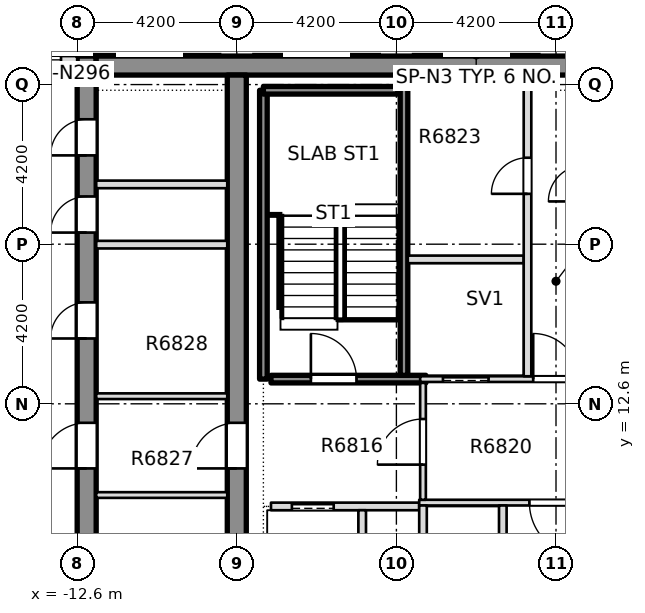
"""IFC4 building model, lengths in metres.
Left out: names, types, materials, properties, quantities, classifications, styles, units other than length and angle.
Written with IfcOpenShell. Run it as: python <this file> out.ifc"""

import sys

from ifc_helpers import new_model, si_unit, direction, frame, frame_2d, origin, place, context, subcontext, project, spatial, rectangle, extrude, element, fill, save


model = new_model("IFC4")
c1 = context("Model", 3, precision=1e-05, world=origin(), true_north=direction((0.0, 1.0)))
c2 = subcontext(c1, "Body", "Model", "MODEL_VIEW")
j1 = project(units=[si_unit("LENGTHUNIT", "METRE"), si_unit("PLANEANGLEUNIT", "RADIAN")], contexts=[c1])
p1 = place(None, origin())
s1 = spatial("IfcSite", under=j1, at=p1, CompositionType="ELEMENT")
p2 = place(p1, origin())
s2 = spatial("IfcBuilding", under=s1, at=p2, CompositionType="ELEMENT")
p3 = place(p2, frame((0.0, 0.0, 257.95)))
s3 = spatial("IfcBuildingStorey", under=s2, at=p3, CompositionType="ELEMENT", Elevation=257.95)
p4 = place(p3, frame((-12.35, -8.4, -0.4), z_axis=(0.0, 0.0, 1.0), x_axis=(0.0, 1.0, 0.0)))
e1 = element("IfcWall", 1, at=p4, inside=s3, PredefinedType="SHEAR", context=c2, shape_type="SweptSolid", body=[
    extrude(rectangle(XDim=30.15, YDim=0.5, at=frame_2d((15.075, 0.0))), origin(), (0.0, 0.0, 1.0), 3.45),
])
p5 = place(p4, frame((5.083, 0.0, 0.4)))
e2 = element("IfcOpeningElement", 2, at=p5, cuts=e1, PredefinedType="OPENING", context=c2, shape_type="SweptSolid", body=[
    extrude(rectangle(XDim=0.95, YDim=2.1, at=frame_2d((0.475, 1.05))), frame((0.0, 0.26, 0.0), z_axis=(0.0, -1.0, 0.0), x_axis=(1.0, 0.0, 0.0)), (0.0, 0.0, 1.0), 0.52),
])
p6 = place(p4, frame((13.933, 0.0, 0.4)))
e3 = element("IfcOpeningElement", 3, at=p6, cuts=e1, PredefinedType="OPENING", context=c2, shape_type="SweptSolid", body=[
    extrude(rectangle(XDim=0.95, YDim=2.1, at=frame_2d((0.475, 1.05))), frame((0.0, 0.26, 0.0), z_axis=(0.0, -1.0, 0.0), x_axis=(1.0, 0.0, 0.0)), (0.0, 0.0, 1.0), 0.52),
])
p7 = place(p4, frame((22.719, 0.0, 0.4)))
e4 = element("IfcOpeningElement", 4, at=p7, cuts=e1, PredefinedType="OPENING", context=c2, shape_type="SweptSolid", body=[
    extrude(rectangle(XDim=0.95, YDim=2.1, at=frame_2d((0.475, 1.05))), frame((0.0, 0.26, 0.0), z_axis=(0.0, -1.0, 0.0), x_axis=(1.0, 0.0, 0.0)), (0.0, 0.0, 1.0), 0.52),
])
p8 = place(p4, frame((25.506, 0.0, 0.4)))
e5 = element("IfcOpeningElement", 5, at=p8, cuts=e1, PredefinedType="OPENING", context=c2, shape_type="SweptSolid", body=[
    extrude(rectangle(XDim=0.95, YDim=2.1, at=frame_2d((0.475, 1.05))), frame((0.0, 0.26, 0.0), z_axis=(0.0, -1.0, 0.0), x_axis=(1.0, 0.0, 0.0)), (0.0, 0.0, 1.0), 0.52),
])
p9 = place(p4, frame((27.537, 0.0, 0.4)))
e6 = element("IfcOpeningElement", 6, at=p9, cuts=e1, PredefinedType="OPENING", context=c2, shape_type="SweptSolid", body=[
    extrude(rectangle(XDim=0.95, YDim=2.1, at=frame_2d((0.475, 1.05))), frame((0.0, 0.26, 0.0), z_axis=(0.0, -1.0, 0.0), x_axis=(1.0, 0.0, 0.0)), (0.0, 0.0, 1.0), 0.52),
])
p10 = place(p4, frame((19.3, 0.0, 0.4)))
e7 = element("IfcOpeningElement", 7, at=p10, cuts=e1, PredefinedType="OPENING", context=c2, shape_type="SweptSolid", body=[
    extrude(rectangle(XDim=1.2, YDim=2.1, at=frame_2d((0.6, 1.05))), frame((0.0, 0.26, 0.0), z_axis=(0.0, -1.0, 0.0), x_axis=(1.0, 0.0, 0.0)), (0.0, 0.0, 1.0), 0.52),
])
p11 = place(p3, frame((-12.1, 21.5, -0.4), z_axis=(0.0, 0.0, 1.0), x_axis=(1.0, 0.0, 0.0)))
e8 = element("IfcWall", 8, at=p11, inside=s3, PredefinedType="SHEAR", context=c2, shape_type="SweptSolid", body=[
    extrude(rectangle(XDim=24.2, YDim=0.5, at=frame_2d((12.1, 0.0))), origin(), (0.0, 0.0, 1.0), 3.45),
])
p12 = place(p3, frame((-8.4, -7.9, -0.4), z_axis=(0.0, 0.0, 1.0), x_axis=(0.0, 1.0, 0.0)))
e9 = element("IfcWall", 9, at=p12, inside=s3, PredefinedType="SHEAR", context=c2, shape_type="SweptSolid", body=[
    extrude(rectangle(XDim=29.15, YDim=0.5, at=frame_2d((14.575, 0.0))), origin(), (0.0, 0.0, 1.0), 3.45),
])
p13 = place(p12, frame((18.8, 0.0, 0.4)))
e10 = element("IfcOpeningElement", 10, at=p13, cuts=e9, PredefinedType="OPENING", context=c2, shape_type="SweptSolid", body=[
    extrude(rectangle(XDim=1.2, YDim=2.1, at=frame_2d((0.6, 1.05))), frame((0.0, 0.26, 0.0), z_axis=(0.0, -1.0, 0.0), x_axis=(1.0, 0.0, 0.0)), (0.0, 0.0, 1.0), 0.52),
])
p14 = place(p3, frame((-12.6, 21.65, 0.0), z_axis=(0.0, 0.0, 1.0), x_axis=(-1.0, 0.0, 0.0)))
e11 = element("IfcWall", 11, at=p14, inside=s3, PredefinedType="STANDARD", context=c2, shape_type="SweptSolid", body=[
    extrude(rectangle(XDim=3.75, YDim=0.2, at=frame_2d((1.875, 0.0))), origin(), (0.0, 0.0, 1.0), 3.05),
])
p15 = place(p14, frame((0.425, 0.0, 0.2)))
e12 = element("IfcOpeningElement", 12, at=p15, cuts=e11, PredefinedType="OPENING", context=c2, shape_type="SweptSolid", body=[
    extrude(rectangle(XDim=1.8, YDim=2.65, at=frame_2d((0.9, 1.325))), frame((0.0, 0.11, 0.0), z_axis=(0.0, -1.0, 0.0), x_axis=(1.0, 0.0, 0.0)), (0.0, 0.0, 1.0), 0.22),
])
p16 = place(p14, frame((2.325, 0.0, 0.0)))
e13 = element("IfcOpeningElement", 13, at=p16, cuts=e11, PredefinedType="OPENING", context=c2, shape_type="SweptSolid", body=[
    extrude(rectangle(XDim=1.0, YDim=2.4, at=frame_2d((0.5, 1.2))), frame((0.0, 0.11, 0.0), z_axis=(0.0, -1.0, 0.0), x_axis=(1.0, 0.0, 0.0)), (0.0, 0.0, 1.0), 0.22),
])
p17 = place(p3, frame((-7.5, 9.9, 0.0), z_axis=(0.0, 0.0, 1.0), x_axis=(1.0, 0.0, 0.0)))
e14 = element("IfcWall", 14, at=p17, inside=s3, PredefinedType="PARTITIONING", context=c2, shape_type="SweptSolid", body=[
    extrude(rectangle(XDim=3.9, YDim=0.2, at=frame_2d((1.95, 0.0))), origin(), (0.0, 0.0, 1.0), 3.05),
])
p18 = place(p17, frame((0.55, 0.0, 0.0)))
e15 = element("IfcOpeningElement", 15, at=p18, cuts=e14, PredefinedType="OPENING", context=c2, shape_type="SweptSolid", body=[
    extrude(rectangle(XDim=1.1, YDim=2.1, at=frame_2d((0.55, 1.05))), frame((0.0, 0.11, 0.0), z_axis=(0.0, -1.0, 0.0), x_axis=(1.0, 0.0, 0.0)), (0.0, 0.0, 1.0), 0.22),
])
p19 = place(p3, frame((-3.6, 10.0, 0.0), z_axis=(0.0, 0.0, 1.0), x_axis=(1.0, 0.0, 0.0)))
e16 = element("IfcWall", 16, at=p19, inside=s3, PredefinedType="PARTITIONING", context=c2, shape_type="SweptSolid", body=[
    extrude(rectangle(XDim=7.2, YDim=0.15, at=frame_2d((3.6, 0.0))), origin(), (0.0, 0.0, 1.0), 3.05),
])
p20 = place(p19, frame((2.9, 0.0, 0.0)))
e17 = element("IfcOpeningElement", 17, at=p20, cuts=e16, PredefinedType="OPENING", context=c2, shape_type="SweptSolid", body=[
    extrude(rectangle(XDim=1.4, YDim=2.1, at=frame_2d((0.7, 1.05))), frame((0.0, 0.085, 0.0), z_axis=(0.0, -1.0, 0.0), x_axis=(1.0, 0.0, 0.0)), (0.0, 0.0, 1.0), 0.17),
])
p21 = place(p3, frame((-7.5, 13.25, 0.0), z_axis=(0.0, 0.0, 1.0), x_axis=(1.0, 0.0, 0.0)))
e18 = element("IfcWall", 18, at=p21, inside=s3, PredefinedType="SOLIDWALL", context=c2, shape_type="SweptSolid", body=[
    extrude(rectangle(XDim=4.075, YDim=0.2, at=frame_2d((2.038, 0.0))), origin(), (0.0, 0.0, 1.0), 3.05),
])
p22 = place(p21, frame((1.05, 0.0, 0.0)))
e19 = element("IfcOpeningElement", 19, at=p22, cuts=e18, PredefinedType="OPENING", context=c2, shape_type="SweptSolid", body=[
    extrude(rectangle(XDim=1.2, YDim=2.1, at=frame_2d((0.6, 1.05))), frame((0.0, 0.11, 0.0), z_axis=(0.0, -1.0, 0.0), x_axis=(1.0, 0.0, 0.0)), (0.0, 0.0, 1.0), 0.22),
])
p23 = place(p3, frame((-3.575, 13.25, 0.0), z_axis=(0.0, 0.0, 1.0), x_axis=(1.0, 0.0, 0.0)))
e20 = element("IfcWall", 20, at=p23, inside=s3, PredefinedType="PARTITIONING", context=c2, shape_type="SweptSolid", body=[
    extrude(rectangle(XDim=7.15, YDim=0.15, at=frame_2d((3.575, 0.0))), origin(), (0.0, 0.0, 1.0), 3.05),
])
p24 = place(p23, frame((0.6, 0.0, 0.0)))
e21 = element("IfcOpeningElement", 21, at=p24, cuts=e20, PredefinedType="OPENING", context=c2, shape_type="SweptSolid", body=[
    extrude(rectangle(XDim=1.2, YDim=2.1, at=frame_2d((0.6, 1.05))), frame((0.0, 0.085, 0.0), z_axis=(0.0, -1.0, 0.0), x_axis=(1.0, 0.0, 0.0)), (0.0, 0.0, 1.0), 0.17),
])
p25 = place(p23, frame((5.4, 0.0, 0.0)))
e22 = element("IfcOpeningElement", 22, at=p25, cuts=e20, PredefinedType="OPENING", context=c2, shape_type="SweptSolid", body=[
    extrude(rectangle(XDim=1.1, YDim=2.1, at=frame_2d((0.55, 1.05))), frame((0.0, 0.085, 0.0), z_axis=(0.0, -1.0, 0.0), x_axis=(1.0, 0.0, 0.0)), (0.0, 0.0, 1.0), 0.17),
])
p26 = place(p23, frame((2.975, 0.0, 0.0)))
e23 = element("IfcOpeningElement", 23, at=p26, cuts=e20, PredefinedType="OPENING", context=c2, shape_type="SweptSolid", body=[
    extrude(rectangle(XDim=1.2, YDim=2.1, at=frame_2d((0.6, 1.05))), frame((0.0, 0.085, 0.0), z_axis=(0.0, -1.0, 0.0), x_axis=(1.0, 0.0, 0.0)), (0.0, 0.0, 1.0), 0.17),
])
p27 = place(p3, frame((-3.9, 16.4, 0.0), z_axis=(0.0, 0.0, 1.0), x_axis=(1.0, 0.0, 0.0)))
e24 = element("IfcWall", 24, at=p27, inside=s3, PredefinedType="PARTITIONING", context=c2, shape_type="SweptSolid", body=[
    extrude(rectangle(XDim=3.05, YDim=0.2, at=frame_2d((1.525, 0.0))), origin(), (0.0, 0.0, 1.0), 3.05),
])
p28 = place(p3, frame((-5.1, 7.075, 0.0), z_axis=(0.0, 0.0, 1.0), x_axis=(0.0, 1.0, 0.0)))
e25 = element("IfcWall", 25, at=p28, inside=s3, PredefinedType="PARTITIONING", context=c2, shape_type="SweptSolid", body=[
    extrude(rectangle(XDim=2.725, YDim=0.2, at=frame_2d((1.363, 0.0))), origin(), (0.0, 0.0, 1.0), 3.05),
])
p29 = place(p3, frame((-4.0, 13.35, 0.0), z_axis=(0.0, 0.0, 1.0), x_axis=(0.0, 1.0, 0.0)))
e26 = element("IfcWall", 26, at=p29, inside=s3, PredefinedType="SOLIDWALL", context=c2, shape_type="SweptSolid", body=[
    extrude(rectangle(XDim=7.899, YDim=0.2, at=frame_2d((3.949, 0.0))), origin(), (0.0, 0.0, 1.0), 3.05),
])
p30 = place(p3, frame((-3.5, 7.075, 0.0), z_axis=(0.0, 0.0, 1.0), x_axis=(0.0, 1.0, 0.0)))
e27 = element("IfcWall", 27, at=p30, inside=s3, PredefinedType="PARTITIONING", context=c2, shape_type="SweptSolid", body=[
    extrude(rectangle(XDim=2.85, YDim=0.2, at=frame_2d((1.425, 0.0))), origin(), (0.0, 0.0, 1.0), 3.05),
])
p31 = place(p3, frame((-3.5, 10.075, 0.0), z_axis=(0.0, 0.0, 1.0), x_axis=(0.0, 1.0, 0.0)))
e28 = element("IfcWall", 28, at=p31, inside=s3, PredefinedType="PARTITIONING", context=c2, shape_type="SweptSolid", body=[
    extrude(rectangle(XDim=3.075, YDim=0.15, at=frame_2d((1.538, 0.0))), origin(), (0.0, 0.0, 1.0), 3.05),
])
p32 = place(p31, frame((0.925, 0.0, 0.0)))
e29 = element("IfcOpeningElement", 29, at=p32, cuts=e28, PredefinedType="OPENING", context=c2, shape_type="SweptSolid", body=[
    extrude(rectangle(XDim=1.2, YDim=2.1, at=frame_2d((0.6, 1.05))), frame((0.0, 0.085, 0.0), z_axis=(0.0, -1.0, 0.0), x_axis=(1.0, 0.0, 0.0)), (0.0, 0.0, 1.0), 0.17),
])
p33 = place(p3, frame((-1.4, 7.075, 0.0), z_axis=(0.0, 0.0, 1.0), x_axis=(0.0, 1.0, 0.0)))
e30 = element("IfcWall", 30, at=p33, inside=s3, PredefinedType="PARTITIONING", context=c2, shape_type="SweptSolid", body=[
    extrude(rectangle(XDim=2.85, YDim=0.2, at=frame_2d((1.425, 0.0))), origin(), (0.0, 0.0, 1.0), 3.05),
])
p34 = place(p3, frame((-0.75, 13.325, 0.0), z_axis=(0.0, 0.0, 1.0), x_axis=(0.0, 1.0, 0.0)))
e31 = element("IfcWall", 31, at=p34, inside=s3, PredefinedType="PARTITIONING", context=c2, shape_type="SweptSolid", body=[
    extrude(rectangle(XDim=7.924, YDim=0.2, at=frame_2d((3.962, 0.0))), origin(), (0.0, 0.0, 1.0), 3.05),
])
p35 = place(p34, frame((4.8, 0.0, 0.0)))
e32 = element("IfcOpeningElement", 32, at=p35, cuts=e31, PredefinedType="OPENING", context=c2, shape_type="SweptSolid", body=[
    extrude(rectangle(XDim=0.95, YDim=2.1, at=frame_2d((0.475, 1.05))), frame((0.0, 0.11, 0.0), z_axis=(0.0, -1.0, 0.0), x_axis=(1.0, 0.0, 0.0)), (0.0, 0.0, 1.0), 0.22),
])
for number, where, z_axis, x_axis in (
    (33, (-12.099, 10.2, 0.0), (0.0, 0.0, 1.0), (1.0, 0.0, 0.0)),
    (34, (-12.099, 12.8, 0.0), (0.0, 0.0, 1.0), (1.0, 0.0, 0.0)),
):
    element("IfcWall", number, at=place(p3, frame(where, z_axis=z_axis, x_axis=x_axis)), inside=s3, PredefinedType="PARTITIONING", context=c2, shape_type="SweptSolid", body=[
        extrude(rectangle(XDim=3.448, YDim=0.15, at=frame_2d((1.724, 0.0))), origin(), (0.0, 0.0, 1.0), 3.05),
    ])
for number, where, z_axis, x_axis in (
    (35, (-12.099, 16.788, 0.0), (0.0, 0.0, 1.0), (1.0, 0.0, 0.0)),
    (36, (-12.099, 18.373, 0.0), (0.0, 0.0, 1.0), (1.0, 0.0, 0.0)),
):
    element("IfcWall", number, at=place(p3, frame(where, z_axis=z_axis, x_axis=x_axis)), inside=s3, PredefinedType="PARTITIONING", context=c2, shape_type="SweptSolid", body=[
        extrude(rectangle(XDim=3.448, YDim=0.2, at=frame_2d((1.724, 0.0))), origin(), (0.0, 0.0, 1.0), 3.05),
    ])
p36 = place(p3, frame((-7.7, 13.25, 0.0), z_axis=(0.0, 0.0, 1.0), x_axis=(0.0, 1.0, 0.0)))
e37 = element("IfcWall", 37, at=p36, inside=s3, PredefinedType="SOLIDWALL", context=c2, shape_type="SweptSolid", body=[
    extrude(rectangle(XDim=7.6, YDim=0.2, at=frame_2d((3.8, 0.0))), origin(), (0.0, 0.0, 1.0), 3.05),
])
p37 = place(p3, frame((-7.7, 20.85, 0.0), z_axis=(0.0, 0.0, 1.0), x_axis=(1.0, 0.0, 0.0)))
e38 = element("IfcWall", 38, at=p37, inside=s3, PredefinedType="SOLIDWALL", context=c2, shape_type="SweptSolid", body=[
    extrude(rectangle(XDim=3.55, YDim=0.2, at=frame_2d((1.775, 0.0))), origin(), (0.0, 0.0, 1.0), 3.05),
])
p38 = place(p15, origin())
e39 = element("IfcWindow", 39, at=p38, inside=s3, PartitioningType="SINGLE_PANEL", PredefinedType="WINDOW", context=c2, shape_type="SweptSolid", body=[
    extrude(rectangle(XDim=1.8, YDim=2.65, at=frame_2d((0.9, 1.325))), frame((0.0, 0.03, 0.0), z_axis=(0.0, -1.0, 0.0), x_axis=(1.0, 0.0, 0.0)), (0.0, 0.0, 1.0), 0.06),
])
fill(e12, e39)
p39 = place(p22, origin())
e40 = element("IfcDoor", 40, at=p39, inside=s3, OperationType="SINGLE_SWING_LEFT", PredefinedType="DOOR", context=c2, shape_type="SweptSolid", body=[
    extrude(rectangle(XDim=1.2, YDim=2.1, at=frame_2d((0.6, 1.05))), frame((0.0, 0.025, 0.0), z_axis=(0.0, -1.0, 0.0), x_axis=(1.0, 0.0, 0.0)), (0.0, 0.0, 1.0), 0.05),
])
fill(e19, e40)
p40 = place(p18, origin())
e41 = element("IfcDoor", 41, at=p40, inside=s3, OperationType="SLIDING_TO_RIGHT", PredefinedType="DOOR", context=c2, shape_type="SweptSolid", body=[
    extrude(rectangle(XDim=1.1, YDim=2.1, at=frame_2d((0.55, 1.05))), frame((0.0, 0.025, 0.0), z_axis=(0.0, -1.0, 0.0), x_axis=(1.0, 0.0, 0.0)), (0.0, 0.0, 1.0), 0.05),
])
fill(e15, e41)
p41 = place(p20, origin())
e42 = element("IfcDoor", 42, at=p41, inside=s3, OperationType="SINGLE_SWING_RIGHT", PredefinedType="DOOR", context=c2, shape_type="SweptSolid", body=[
    extrude(rectangle(XDim=1.4, YDim=2.1, at=frame_2d((0.7, 1.05))), frame((0.0, 0.025, 0.0), z_axis=(0.0, -1.0, 0.0), x_axis=(1.0, 0.0, 0.0)), (0.0, 0.0, 1.0), 0.05),
])
fill(e17, e42)
p42 = place(p24, origin())
e43 = element("IfcDoor", 43, at=p42, inside=s3, OperationType="SLIDING_TO_RIGHT", PredefinedType="DOOR", context=c2, shape_type="SweptSolid", body=[
    extrude(rectangle(XDim=1.2, YDim=2.1, at=frame_2d((0.6, 1.05))), frame((0.0, 0.025, 0.0), z_axis=(0.0, -1.0, 0.0), x_axis=(1.0, 0.0, 0.0)), (0.0, 0.0, 1.0), 0.05),
])
fill(e21, e43)
p43 = place(p26, origin())
e44 = element("IfcDoor", 44, at=p43, inside=s3, OperationType="SINGLE_SWING_RIGHT", PredefinedType="DOOR", context=c2, shape_type="SweptSolid", body=[
    extrude(rectangle(XDim=1.2, YDim=2.1, at=frame_2d((0.6, 1.05))), frame((0.0, 0.025, 0.0), z_axis=(0.0, -1.0, 0.0), x_axis=(1.0, 0.0, 0.0)), (0.0, 0.0, 1.0), 0.05),
])
fill(e23, e44)
p44 = place(p35, origin())
e45 = element("IfcDoor", 45, at=p44, inside=s3, OperationType="SINGLE_SWING_RIGHT", PredefinedType="DOOR", context=c2, shape_type="SweptSolid", body=[
    extrude(rectangle(XDim=0.95, YDim=2.1, at=frame_2d((0.475, 1.05))), frame((0.0, 0.025, 0.0), z_axis=(0.0, -1.0, 0.0), x_axis=(1.0, 0.0, 0.0)), (0.0, 0.0, 1.0), 0.05),
])
fill(e32, e45)
p45 = place(p32, origin())
e46 = element("IfcDoor", 46, at=p45, inside=s3, OperationType="SINGLE_SWING_RIGHT", PredefinedType="DOOR", context=c2, shape_type="SweptSolid", body=[
    extrude(rectangle(XDim=1.2, YDim=2.1, at=frame_2d((0.6, 1.05))), frame((0.0, 0.025, 0.0), z_axis=(0.0, -1.0, 0.0), x_axis=(1.0, 0.0, 0.0)), (0.0, 0.0, 1.0), 0.05),
])
fill(e29, e46)
p46 = place(p7, origin())
e47 = element("IfcDoor", 47, at=p46, inside=s3, OperationType="SINGLE_SWING_LEFT", PredefinedType="DOOR", context=c2, shape_type="SweptSolid", body=[
    extrude(rectangle(XDim=0.95, YDim=2.1, at=frame_2d((0.475, 1.05))), frame((0.0, 0.025, 0.0), z_axis=(0.0, -1.0, 0.0), x_axis=(1.0, 0.0, 0.0)), (0.0, 0.0, 1.0), 0.05),
])
fill(e4, e47)
p47 = place(p8, origin())
e48 = element("IfcDoor", 48, at=p47, inside=s3, OperationType="SINGLE_SWING_LEFT", PredefinedType="DOOR", context=c2, shape_type="SweptSolid", body=[
    extrude(rectangle(XDim=0.95, YDim=2.1, at=frame_2d((0.475, 1.05))), frame((0.0, 0.025, 0.0), z_axis=(0.0, -1.0, 0.0), x_axis=(1.0, 0.0, 0.0)), (0.0, 0.0, 1.0), 0.05),
])
fill(e5, e48)
p48 = place(p9, origin())
e49 = element("IfcDoor", 49, at=p48, inside=s3, OperationType="SINGLE_SWING_LEFT", PredefinedType="DOOR", context=c2, shape_type="SweptSolid", body=[
    extrude(rectangle(XDim=0.95, YDim=2.1, at=frame_2d((0.475, 1.05))), frame((0.0, 0.025, 0.0), z_axis=(0.0, -1.0, 0.0), x_axis=(1.0, 0.0, 0.0)), (0.0, 0.0, 1.0), 0.05),
])
fill(e6, e49)
p49 = place(p10, origin())
e50 = element("IfcDoor", 50, at=p49, inside=s3, OperationType="SINGLE_SWING_LEFT", PredefinedType="DOOR", context=c2, shape_type="SweptSolid", body=[
    extrude(rectangle(XDim=1.2, YDim=2.1, at=frame_2d((0.6, 1.05))), frame((0.0, 0.025, 0.0), z_axis=(0.0, -1.0, 0.0), x_axis=(1.0, 0.0, 0.0)), (0.0, 0.0, 1.0), 0.05),
])
fill(e7, e50)
p50 = place(p13, origin())
e51 = element("IfcDoor", 51, at=p50, inside=s3, OperationType="SINGLE_SWING_LEFT", PredefinedType="DOOR", context=c2, shape_type="SweptSolid", body=[
    extrude(rectangle(XDim=1.2, YDim=2.1, at=frame_2d((0.6, 1.05))), frame((0.0, 0.025, 0.0), z_axis=(0.0, -1.0, 0.0), x_axis=(1.0, 0.0, 0.0)), (0.0, 0.0, 1.0), 0.05),
])
fill(e10, e51)
save(model, sys.argv[1])
